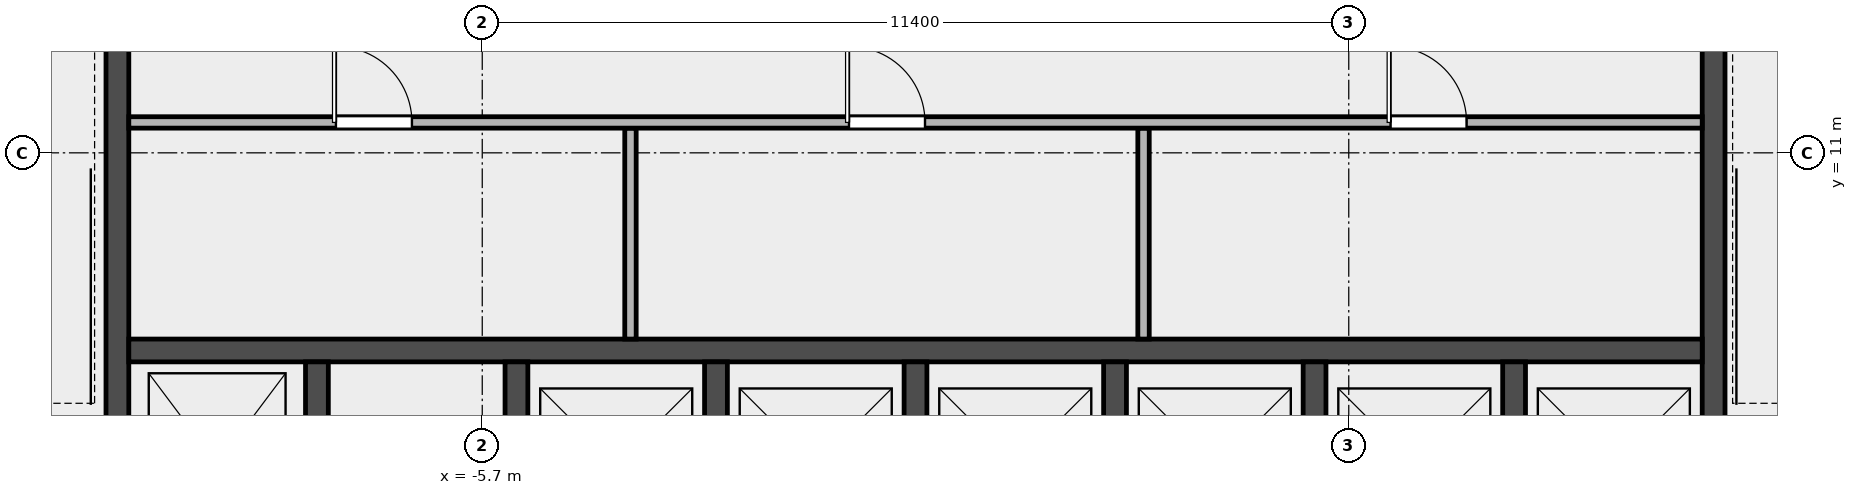
"""IFC4 building model, lengths in metres.
Left out: names, types, materials, properties, quantities, classifications, styles, units other than length and angle.
Written with IfcOpenShell. Run it as: python <this file> out.ifc"""

import sys

from ifc_helpers import new_model, si_unit, direction, frame, frame_2d, origin, place, context, subcontext, project, spatial, rectangle, extrude, element, fill, save


model = new_model("IFC4")
c1 = context("Model", 3, precision=1e-05, world=origin(), true_north=direction((0.0, 1.0)))
c2 = subcontext(c1, "Body", "Model", "MODEL_VIEW")
j1 = project(units=[si_unit("LENGTHUNIT", "METRE"), si_unit("PLANEANGLEUNIT", "RADIAN")], contexts=[c1])
p1 = place(None, origin())
s1 = spatial("IfcSite", under=j1, at=p1, CompositionType="ELEMENT")
p2 = place(p1, origin())
s2 = spatial("IfcBuilding", under=s1, at=p2, CompositionType="ELEMENT")
p3 = place(p2, frame((0.0, 0.0, 329.4)))
s3 = spatial("IfcBuildingStorey", under=s2, at=p3, CompositionType="ELEMENT", Elevation=329.4)
for number, where, z_axis, x_axis in (
    (1, (-10.5, 5.25, 0.0), (0.0, 0.0, 1.0), (0.0, 1.0, 0.0)),
    (2, (10.5, 5.25, 0.0), (0.0, 0.0, 1.0), (0.0, 1.0, 0.0)),
):
    element("IfcWall", number, at=place(p3, frame(where, z_axis=z_axis, x_axis=x_axis)), inside=s3, PredefinedType="SHEAR", context=c2, shape_type="SweptSolid", body=[
        extrude(rectangle(XDim=7.65, YDim=0.3, at=frame_2d((3.825, 0.0))), origin(), (0.0, 0.0, 1.0), 3.7),
    ])
p4 = place(p3, frame((-10.35, 8.4, 0.0), z_axis=(0.0, 0.0, 1.0), x_axis=(1.0, 0.0, 0.0)))
e3 = element("IfcWall", 3, at=p4, inside=s3, PredefinedType="SOLIDWALL", context=c2, shape_type="SweptSolid", body=[
    extrude(rectangle(XDim=20.7, YDim=0.3, at=frame_2d((10.35, 0.0))), origin(), (0.0, 0.0, 1.0), 3.7),
])
for number, where, z_axis, x_axis in (
    (4, (-7.875, 5.55, 0.0), (0.0, 0.0, 1.0), (0.0, 1.0, 0.0)),
    (5, (-5.25, 5.55, 0.0), (0.0, 0.0, 1.0), (0.0, 1.0, 0.0)),
    (6, (-2.625, 5.55, 0.0), (0.0, 0.0, 1.0), (0.0, 1.0, 0.0)),
    (7, (0.0, 5.55, 0.0), (0.0, 0.0, 1.0), (0.0, 1.0, 0.0)),
    (8, (2.625, 5.55, 0.0), (0.0, 0.0, 1.0), (0.0, 1.0, 0.0)),
    (9, (5.25, 5.55, 0.0), (0.0, 0.0, 1.0), (0.0, 1.0, 0.0)),
    (10, (7.875, 5.55, 0.0), (0.0, 0.0, 1.0), (0.0, 1.0, 0.0)),
):
    element("IfcWall", number, at=place(p3, frame(where, z_axis=z_axis, x_axis=x_axis)), inside=s3, PredefinedType="SOLIDWALL", context=c2, shape_type="SweptSolid", body=[
        extrude(rectangle(XDim=2.7, YDim=0.3, at=frame_2d((1.35, 0.0))), origin(), (0.0, 0.0, 1.0), 3.7),
    ])
for number, where, z_axis, x_axis in (
    (11, (-3.75, 8.55, 0.0), (0.0, 0.0, 1.0), (0.0, 1.0, 0.0)),
    (12, (3.0, 8.55, 0.0), (0.0, 0.0, 1.0), (0.0, 1.0, 0.0)),
):
    element("IfcWall", number, at=place(p3, frame(where, z_axis=z_axis, x_axis=x_axis)), inside=s3, PredefinedType="PARTITIONING", context=c2, shape_type="SweptSolid", body=[
        extrude(rectangle(XDim=2.775, YDim=0.15, at=frame_2d((1.387, 0.0))), origin(), (0.0, 0.0, 1.0), 3.7),
    ])
p5 = place(p3, frame((-10.35, 11.4, 0.0), z_axis=(0.0, 0.0, 1.0), x_axis=(1.0, 0.0, 0.0)))
e13 = element("IfcWall", 13, at=p5, inside=s3, PredefinedType="PARTITIONING", context=c2, shape_type="SweptSolid", body=[
    extrude(rectangle(XDim=20.7, YDim=0.15, at=frame_2d((10.35, 0.0))), origin(), (0.0, 0.0, 1.0), 3.7),
])
p6 = place(p5, frame((2.725, 0.0, 0.0)))
e14 = element("IfcOpeningElement", 14, at=p6, cuts=e13, PredefinedType="OPENING", context=c2, shape_type="SweptSolid", body=[
    extrude(rectangle(XDim=1.0, YDim=2.1, at=frame_2d((0.5, 1.05))), frame((0.0, 0.087, 0.0), z_axis=(0.0, -1.0, 0.0), x_axis=(1.0, 0.0, 0.0)), (0.0, 0.0, 1.0), 0.174),
])
p7 = place(p5, frame((9.475, 0.0, 0.0)))
e15 = element("IfcOpeningElement", 15, at=p7, cuts=e13, PredefinedType="OPENING", context=c2, shape_type="SweptSolid", body=[
    extrude(rectangle(XDim=1.0, YDim=2.1, at=frame_2d((0.5, 1.05))), frame((0.0, 0.087, 0.0), z_axis=(0.0, -1.0, 0.0), x_axis=(1.0, 0.0, 0.0)), (0.0, 0.0, 1.0), 0.174),
])
p8 = place(p5, frame((16.6, 0.0, 0.0)))
e16 = element("IfcOpeningElement", 16, at=p8, cuts=e13, PredefinedType="OPENING", context=c2, shape_type="SweptSolid", body=[
    extrude(rectangle(XDim=1.0, YDim=2.1, at=frame_2d((0.5, 1.05))), frame((0.0, 0.087, 0.0), z_axis=(0.0, -1.0, 0.0), x_axis=(1.0, 0.0, 0.0)), (0.0, 0.0, 1.0), 0.174),
])
p9 = place(p6, origin())
e17 = element("IfcDoor", 17, at=p9, inside=s3, OperationType="SINGLE_SWING_LEFT", PredefinedType="DOOR", context=c2, shape_type="SweptSolid", body=[
    extrude(rectangle(XDim=1.0, YDim=2.1, at=frame_2d((0.5, 1.05))), frame((0.0, 0.025, 0.0), z_axis=(0.0, -1.0, 0.0), x_axis=(1.0, 0.0, 0.0)), (0.0, 0.0, 1.0), 0.05),
])
fill(e14, e17)
p10 = place(p7, origin())
e18 = element("IfcDoor", 18, at=p10, inside=s3, OperationType="SINGLE_SWING_LEFT", PredefinedType="DOOR", context=c2, shape_type="SweptSolid", body=[
    extrude(rectangle(XDim=1.0, YDim=2.1, at=frame_2d((0.5, 1.05))), frame((0.0, 0.025, 0.0), z_axis=(0.0, -1.0, 0.0), x_axis=(1.0, 0.0, 0.0)), (0.0, 0.0, 1.0), 0.05),
])
fill(e15, e18)
p11 = place(p8, origin())
e19 = element("IfcDoor", 19, at=p11, inside=s3, OperationType="SINGLE_SWING_LEFT", PredefinedType="DOOR", context=c2, shape_type="SweptSolid", body=[
    extrude(rectangle(XDim=1.0, YDim=2.1, at=frame_2d((0.5, 1.05))), frame((0.0, 0.025, 0.0), z_axis=(0.0, -1.0, 0.0), x_axis=(1.0, 0.0, 0.0)), (0.0, 0.0, 1.0), 0.05),
])
fill(e16, e19)
save(model, sys.argv[1])
